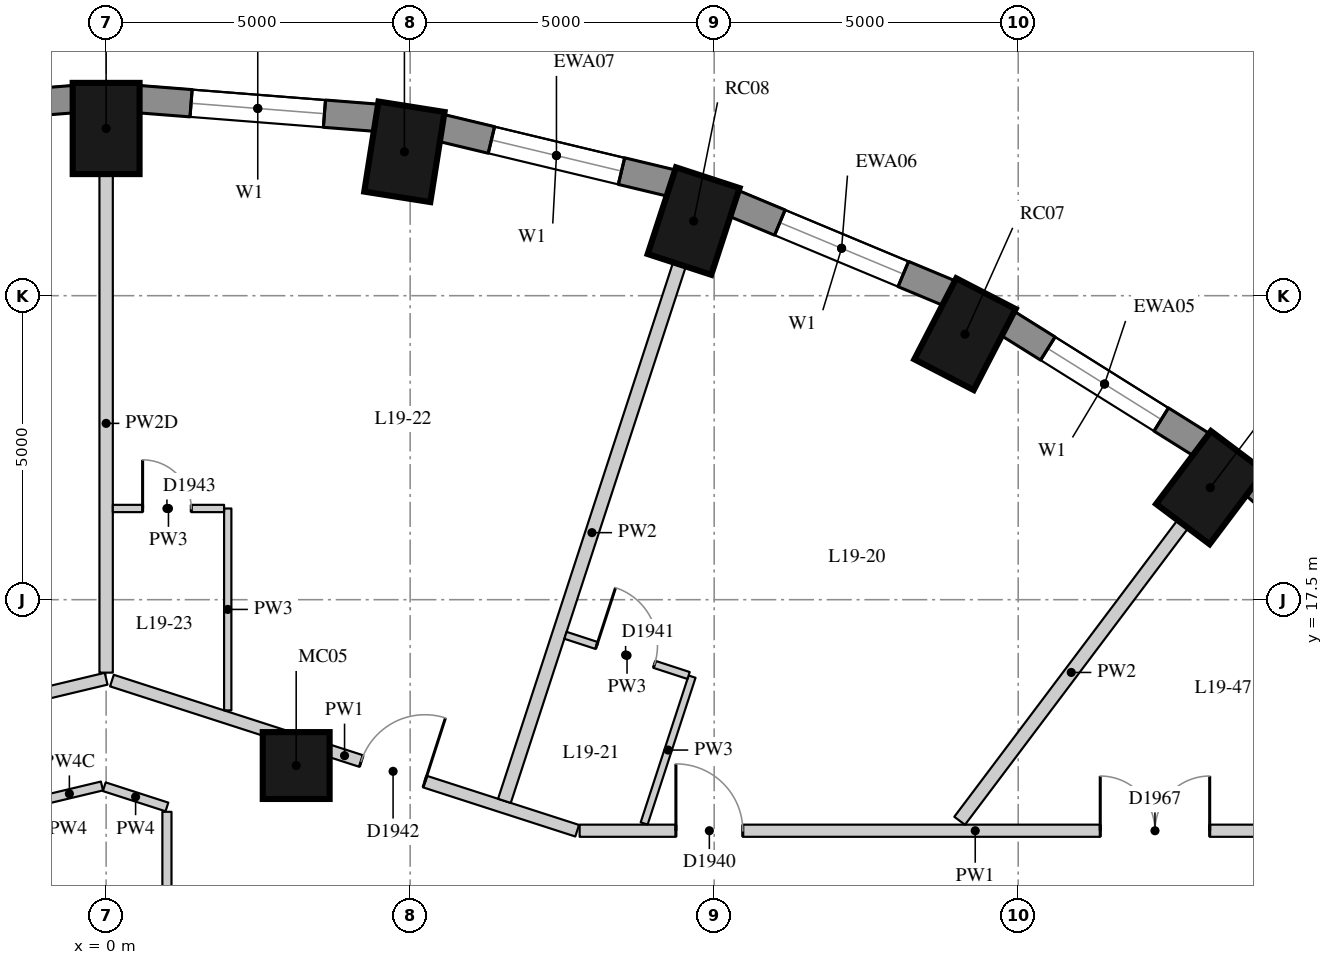
"""IFC4 building model, lengths in metres.
Left out: names, types, materials, properties, quantities, classifications, styles, units other than length and angle.
Written with IfcOpenShell. Run it as: python <this file> out.ifc"""

import sys

from ifc_helpers import new_model, si_unit, direction, frame, frame_2d, origin, origin_2d, place, context, subcontext, project, spatial, rectangle, extrude, element, fill, save


model = new_model("IFC4")
c1 = context("Model", 3, precision=1e-05, world=origin(), true_north=direction((0.0, 1.0)))
c2 = subcontext(c1, "Body", "Model", "MODEL_VIEW")
j1 = project(units=[si_unit("LENGTHUNIT", "METRE"), si_unit("PLANEANGLEUNIT", "RADIAN")], contexts=[c1])
p1 = place(None, origin())
s1 = spatial("IfcSite", under=j1, at=p1, CompositionType="ELEMENT")
p2 = place(p1, origin())
s2 = spatial("IfcBuilding", under=s1, at=p2, CompositionType="ELEMENT")
p3 = place(p2, frame((0.0, 0.0, 71.2)))
s3 = spatial("IfcBuildingStorey", under=s2, at=p3, CompositionType="ELEMENT", Elevation=71.2)
for number, where, z_axis, x_axis in (
    (1, (18.159, 19.343, 0.0), (0.0, 0.0, 1.0), (0.601, 0.799, 0.0)),
    (2, (14.125, 21.867, 0.0), (0.0, 0.0, 1.0), (0.46, 0.888, 0.0)),
    (3, (9.662, 23.727, 0.0), (0.0, 0.0, 1.0), (0.31, 0.951, 0.0)),
    (4, (4.906, 24.866, 0.0), (0.0, 0.0, 1.0), (0.156, 0.988, 0.0)),
    (5, (0.0, 25.25, 0.0), (0.0, 0.0, 1.0), (0.0, 1.0, 0.0)),
):
    element("IfcColumn", number, at=place(p3, frame(where, z_axis=z_axis, x_axis=x_axis)), inside=s3, PredefinedType="COLUMN", context=c2, shape_type="SweptSolid", body=[
        extrude(rectangle(XDim=1.5, YDim=1.1, at=origin_2d()), origin(), (0.0, 0.0, 1.0), 3.3),
    ])
p4 = place(p3, frame((3.126, 14.772, 0.0), z_axis=(0.0, 0.0, 1.0), x_axis=(1.0, 0.0, 0.0)))
e6 = element("IfcColumn", 6, at=p4, inside=s3, PredefinedType="COLUMN", context=c2, shape_type="SweptSolid", body=[
    extrude(rectangle(XDim=1.1, YDim=1.1, at=origin_2d()), origin(), (0.0, 0.0, 1.0), 3.3),
])
p5 = place(p3, frame((21.627, 16.943, 0.0), z_axis=(0.0, 0.0, 1.0), x_axis=(-0.745526233716, 0.66647628228, 0.0)))
e7 = element("IfcWall", 7, at=p5, inside=s3, PredefinedType="SOLIDWALL", context=c2, shape_type="SweptSolid", body=[
    extrude(rectangle(XDim=3.697, YDim=0.45, at=frame_2d((1.848, 0.0))), origin(), (0.0, 0.0, 1.0), 3.02),
])
p6 = place(p3, frame((18.023, 20.044, 0.0), z_axis=(0.0, 0.0, 1.0), x_axis=(-0.847635480093, 0.530579016629, 0.0)))
e8 = element("IfcWall", 8, at=p6, inside=s3, PredefinedType="SOLIDWALL", context=c2, shape_type="SweptSolid", body=[
    extrude(rectangle(XDim=3.782, YDim=0.45, at=frame_2d((1.891, 0.0))), origin(), (0.0, 0.0, 1.0), 3.02),
])
p7 = place(p6, frame((0.791, 0.0, 0.4)))
e9 = element("IfcOpeningElement", 9, at=p7, cuts=e8, PredefinedType="OPENING", context=c2, shape_type="SweptSolid", body=[
    extrude(rectangle(XDim=2.2, YDim=1.75, at=frame_2d((1.1, 0.875))), frame((0.0, 0.235, 0.0), z_axis=(0.0, -1.0, 0.0), x_axis=(1.0, 0.0, 0.0)), (0.0, 0.0, 1.0), 0.47),
])
p8 = place(p3, frame((13.875, 22.537, 0.0), z_axis=(0.0, 0.0, 1.0), x_axis=(-0.923031964282, 0.384723267966, 0.0)))
e10 = element("IfcWall", 10, at=p8, inside=s3, PredefinedType="SOLIDWALL", context=c2, shape_type="SweptSolid", body=[
    extrude(rectangle(XDim=3.856, YDim=0.45, at=frame_2d((1.928, 0.0))), origin(), (0.0, 0.0, 1.0), 3.02),
])
p9 = place(p8, frame((0.828, 0.0, 0.4)))
e11 = element("IfcOpeningElement", 11, at=p9, cuts=e10, PredefinedType="OPENING", context=c2, shape_type="SweptSolid", body=[
    extrude(rectangle(XDim=2.2, YDim=1.75, at=frame_2d((1.1, 0.875))), frame((0.0, 0.235, 0.0), z_axis=(0.0, -1.0, 0.0), x_axis=(1.0, 0.0, 0.0)), (0.0, 0.0, 1.0), 0.47),
])
p10 = place(p3, frame((9.308, 24.35, 0.0), z_axis=(0.0, 0.0, 1.0), x_axis=(-0.972496561493, 0.232917233979, 0.0)))
e12 = element("IfcWall", 12, at=p10, inside=s3, PredefinedType="SOLIDWALL", context=c2, shape_type="SweptSolid", body=[
    extrude(rectangle(XDim=3.911, YDim=0.45, at=frame_2d((1.956, 0.0))), origin(), (0.0, 0.0, 1.0), 3.02),
])
p11 = place(p10, frame((0.855, 0.0, 0.4)))
e13 = element("IfcOpeningElement", 13, at=p11, cuts=e12, PredefinedType="OPENING", context=c2, shape_type="SweptSolid", body=[
    extrude(rectangle(XDim=2.2, YDim=1.75, at=frame_2d((1.1, 0.875))), frame((0.0, 0.235, 0.0), z_axis=(0.0, -1.0, 0.0), x_axis=(1.0, 0.0, 0.0)), (0.0, 0.0, 1.0), 0.47),
])
p12 = place(p3, frame((4.457, 25.426, 0.0), z_axis=(0.0, 0.0, 1.0), x_axis=(-0.996955972145, 0.077966592873, 0.0)))
e14 = element("IfcWall", 14, at=p12, inside=s3, PredefinedType="SOLIDWALL", context=c2, shape_type="SweptSolid", body=[
    extrude(rectangle(XDim=3.939, YDim=0.45, at=frame_2d((1.97, 0.0))), origin(), (0.0, 0.0, 1.0), 3.02),
])
p13 = place(p12, frame((0.87, 0.0, 0.4)))
e15 = element("IfcOpeningElement", 15, at=p13, cuts=e14, PredefinedType="OPENING", context=c2, shape_type="SweptSolid", body=[
    extrude(rectangle(XDim=2.2, YDim=1.75, at=frame_2d((1.1, 0.875))), frame((0.0, 0.235, 0.0), z_axis=(0.0, -1.0, 0.0), x_axis=(1.0, 0.0, 0.0)), (0.0, 0.0, 1.0), 0.47),
])
p14 = place(p3, frame((-0.53, 25.733, 0.0), z_axis=(0.0, 0.0, 1.0), x_axis=(-0.996955972145, -0.077966592873, 0.0)))
e16 = element("IfcWall", 16, at=p14, inside=s3, PredefinedType="SOLIDWALL", context=c2, shape_type="SweptSolid", body=[
    extrude(rectangle(XDim=3.939, YDim=0.45, at=frame_2d((1.97, 0.0))), origin(), (0.0, 0.0, 1.0), 3.02),
])
p15 = place(p14, frame((0.87, 0.0, 0.4)))
e17 = element("IfcOpeningElement", 17, at=p15, cuts=e16, PredefinedType="OPENING", context=c2, shape_type="SweptSolid", body=[
    extrude(rectangle(XDim=2.2, YDim=1.75, at=frame_2d((1.1, 0.875))), frame((0.0, 0.235, 0.0), z_axis=(0.0, -1.0, 0.0), x_axis=(1.0, 0.0, 0.0)), (0.0, 0.0, 1.0), 0.47),
])
p16 = place(p3, frame((-7.683, 14.365, 0.0), z_axis=(0.0, 0.0, 1.0), x_axis=(0.972657109353, 0.23224587752, 0.0)))
e18 = element("IfcWall", 18, at=p16, inside=s3, PredefinedType="PARTITIONING", context=c2, shape_type="SweptSolid", body=[
    extrude(rectangle(XDim=7.899, YDim=0.2, at=frame_2d((3.949, 0.0))), origin(), (0.0, 0.0, 1.0), 2.57),
])
p17 = place(p16, frame((0.22, 0.0, 0.0)))
e19 = element("IfcOpeningElement", 19, at=p17, cuts=e18, PredefinedType="OPENING", context=c2, shape_type="SweptSolid", body=[
    extrude(rectangle(XDim=1.1, YDim=2.1, at=frame_2d((0.55, 1.05))), frame((0.0, 0.11, 0.0), z_axis=(0.0, -1.0, 0.0), x_axis=(1.0, 0.0, 0.0)), (0.0, 0.0, 1.0), 0.22),
])
p18 = place(p3, frame((0.095, 16.169, 0.0), z_axis=(0.0, 0.0, 1.0), x_axis=(0.951667112614, -0.307131416122, 0.0)))
e20 = element("IfcWall", 20, at=p18, inside=s3, PredefinedType="PARTITIONING", context=c2, shape_type="SweptSolid", body=[
    extrude(rectangle(XDim=8.041, YDim=0.2, at=frame_2d((4.02, 0.0))), origin(), (0.0, 0.0, 1.0), 3.02),
])
p19 = place(p18, frame((4.309, 0.0, 0.0)))
e21 = element("IfcOpeningElement", 21, at=p19, cuts=e20, PredefinedType="OPENING", context=c2, shape_type="SweptSolid", body=[
    extrude(rectangle(XDim=1.1, YDim=2.1, at=frame_2d((0.55, 1.05))), frame((0.0, 0.11, 0.0), z_axis=(0.0, -1.0, 0.0), x_axis=(1.0, 0.0, 0.0)), (0.0, 0.0, 1.0), 0.22),
])
p20 = place(p3, frame((7.787, 13.7, 0.0), z_axis=(0.0, 0.0, 1.0), x_axis=(1.0, 0.0, 0.0)))
e22 = element("IfcWall", 22, at=p20, inside=s3, PredefinedType="PARTITIONING", context=c2, shape_type="SweptSolid", body=[
    extrude(rectangle(XDim=13.013, YDim=0.2, at=frame_2d((6.506, 0.0))), origin(), (0.0, 0.0, 1.0), 3.02),
])
p21 = place(p20, frame((1.583, 0.0, 0.0)))
e23 = element("IfcOpeningElement", 23, at=p21, cuts=e22, PredefinedType="OPENING", context=c2, shape_type="SweptSolid", body=[
    extrude(rectangle(XDim=1.1, YDim=2.1, at=frame_2d((0.55, 1.05))), frame((0.0, 0.11, 0.0), z_axis=(0.0, -1.0, 0.0), x_axis=(1.0, 0.0, 0.0)), (0.0, 0.0, 1.0), 0.22),
])
p22 = place(p20, frame((8.562, 0.0, 0.0)))
e24 = element("IfcOpeningElement", 24, at=p22, cuts=e22, PredefinedType="OPENING", context=c2, shape_type="SweptSolid", body=[
    extrude(rectangle(XDim=1.8, YDim=2.1, at=frame_2d((0.9, 1.05))), frame((0.0, 0.11, 0.0), z_axis=(0.0, -1.0, 0.0), x_axis=(1.0, 0.0, 0.0)), (0.0, 0.0, 1.0), 0.22),
])
p23 = place(p3, frame((-1.14, 14.18, 0.0), z_axis=(0.0, 0.0, 1.0), x_axis=(0.972668158826, 0.232199596913, 0.0)))
e25 = element("IfcWall", 25, at=p23, inside=s3, PredefinedType="PARTITIONING", context=c2, shape_type="SweptSolid", body=[
    extrude(rectangle(XDim=1.102, YDim=0.15, at=frame_2d((0.551, 0.0))), origin(), (0.0, 0.0, 1.0), 2.42),
])
p24 = place(p3, frame((-0.031, 14.424, 0.0), z_axis=(0.0, 0.0, 1.0), x_axis=(0.951683114319, -0.307081829354, 0.0)))
e26 = element("IfcWall", 26, at=p24, inside=s3, PredefinedType="PARTITIONING", context=c2, shape_type="SweptSolid", body=[
    extrude(rectangle(XDim=1.083, YDim=0.15, at=frame_2d((0.542, 0.0))), origin(), (0.0, 0.0, 1.0), 3.02),
])
p25 = place(p3, frame((1.0, 14.011, 0.0), z_axis=(0.0, 0.0, 1.0), x_axis=(0.0, -1.0, 0.0)))
e27 = element("IfcWall", 27, at=p25, inside=s3, PredefinedType="PARTITIONING", context=c2, shape_type="SweptSolid", body=[
    extrude(rectangle(XDim=4.861, YDim=0.15, at=frame_2d((2.431, 0.0))), origin(), (0.0, 0.0, 1.0), 3.02),
])
p26 = place(p3, frame((17.708, 18.743, 0.0), z_axis=(0.0, 0.0, 1.0), x_axis=(-0.601170031872, -0.799121137738, 0.0)))
e28 = element("IfcWall", 28, at=p26, inside=s3, PredefinedType="PARTITIONING", context=c2, shape_type="SweptSolid", body=[
    extrude(rectangle(XDim=6.106, YDim=0.22, at=frame_2d((3.053, 0.0))), origin(), (0.0, 0.0, 1.0), 3.02),
])
p27 = place(p3, frame((9.429, 23.014, 0.0), z_axis=(0.0, 0.0, 1.0), x_axis=(-0.310223734739, -0.950663575827, 0.0)))
e29 = element("IfcWall", 29, at=p27, inside=s3, PredefinedType="PARTITIONING", context=c2, shape_type="SweptSolid", body=[
    extrude(rectangle(XDim=9.281, YDim=0.22, at=frame_2d((4.64, 0.0))), origin(), (0.0, 0.0, 1.0), 3.02),
])
p28 = place(p3, frame((0.0, 24.5, 0.0), z_axis=(0.0, 0.0, 1.0), x_axis=(0.0, -1.0, 0.0)))
e30 = element("IfcWall", 30, at=p28, inside=s3, PredefinedType="PARTITIONING", context=c2, shape_type="SweptSolid", body=[
    extrude(rectangle(XDim=8.2, YDim=0.22, at=frame_2d((4.1, 0.0))), origin(), (0.0, 0.0, 1.0), 2.47),
])
p29 = place(p3, frame((8.848, 13.819, 0.0), z_axis=(0.0, 0.0, 1.0), x_axis=(0.310254704997, 0.95065346895, 0.0)))
e31 = element("IfcWall", 31, at=p29, inside=s3, PredefinedType="PARTITIONING", context=c2, shape_type="SweptSolid", body=[
    extrude(rectangle(XDim=2.541, YDim=0.12, at=frame_2d((1.271, 0.0))), origin(), (0.0, 0.0, 1.0), 3.02),
])
p30 = place(p3, frame((2.0, 15.68, 0.0), z_axis=(0.0, 0.0, 1.0), x_axis=(0.0, 1.0, 0.0)))
e32 = element("IfcWall", 32, at=p30, inside=s3, PredefinedType="PARTITIONING", context=c2, shape_type="SweptSolid", body=[
    extrude(rectangle(XDim=3.32, YDim=0.12, at=frame_2d((1.66, 0.0))), origin(), (0.0, 0.0, 1.0), 3.02),
])
p31 = place(p3, frame((9.579, 16.253, 0.0), z_axis=(0.0, 0.0, 1.0), x_axis=(-0.950613738429, 0.310376417129, 0.0)))
e33 = element("IfcWall", 33, at=p31, inside=s3, PredefinedType="PARTITIONING", context=c2, shape_type="SweptSolid", body=[
    extrude(rectangle(XDim=2.13, YDim=0.12, at=frame_2d((1.065, 0.0))), origin(), (0.0, 0.0, 1.0), 3.02),
])
p32 = place(p31, frame((0.59, 0.0, 0.0)))
e34 = element("IfcOpeningElement", 34, at=p32, cuts=e33, PredefinedType="OPENING", context=c2, shape_type="SweptSolid", body=[
    extrude(rectangle(XDim=1.0, YDim=2.1, at=frame_2d((0.5, 1.05))), frame((0.0, 0.07, 0.0), z_axis=(0.0, -1.0, 0.0), x_axis=(1.0, 0.0, 0.0)), (0.0, 0.0, 1.0), 0.14),
])
p33 = place(p3, frame((1.94, 19.0, 0.0), z_axis=(0.0, 0.0, 1.0), x_axis=(-1.0, 0.0, 0.0)))
e35 = element("IfcWall", 35, at=p33, inside=s3, PredefinedType="PARTITIONING", context=c2, shape_type="SweptSolid", body=[
    extrude(rectangle(XDim=1.83, YDim=0.12, at=frame_2d((0.915, 0.0))), origin(), (0.0, 0.0, 1.0), 3.02),
])
p34 = place(p33, frame((0.54, 0.0, 0.0)))
e36 = element("IfcOpeningElement", 36, at=p34, cuts=e35, PredefinedType="OPENING", context=c2, shape_type="SweptSolid", body=[
    extrude(rectangle(XDim=0.8, YDim=2.1, at=frame_2d((0.4, 1.05))), frame((0.0, 0.07, 0.0), z_axis=(0.0, -1.0, 0.0), x_axis=(1.0, 0.0, 0.0)), (0.0, 0.0, 1.0), 0.14),
])
p35 = place(p7, origin())
e37 = element("IfcWindow", 37, at=p35, inside=s3, PartitioningType="SINGLE_PANEL", PredefinedType="WINDOW", context=c2, shape_type="SweptSolid", body=[
    extrude(rectangle(XDim=2.2, YDim=1.75, at=frame_2d((1.1, 0.875))), frame((0.0, 0.035, 0.0), z_axis=(0.0, -1.0, 0.0), x_axis=(1.0, 0.0, 0.0)), (0.0, 0.0, 1.0), 0.06),
])
fill(e9, e37)
p36 = place(p9, origin())
e38 = element("IfcWindow", 38, at=p36, inside=s3, PartitioningType="SINGLE_PANEL", PredefinedType="WINDOW", context=c2, shape_type="SweptSolid", body=[
    extrude(rectangle(XDim=2.2, YDim=1.75, at=frame_2d((1.1, 0.875))), frame((0.0, 0.035, 0.0), z_axis=(0.0, -1.0, 0.0), x_axis=(1.0, 0.0, 0.0)), (0.0, 0.0, 1.0), 0.06),
])
fill(e11, e38)
p37 = place(p11, origin())
e39 = element("IfcWindow", 39, at=p37, inside=s3, PartitioningType="SINGLE_PANEL", PredefinedType="WINDOW", context=c2, shape_type="SweptSolid", body=[
    extrude(rectangle(XDim=2.2, YDim=1.75, at=frame_2d((1.1, 0.875))), frame((0.0, 0.035, 0.0), z_axis=(0.0, -1.0, 0.0), x_axis=(1.0, 0.0, 0.0)), (0.0, 0.0, 1.0), 0.06),
])
fill(e13, e39)
p38 = place(p13, origin())
e40 = element("IfcWindow", 40, at=p38, inside=s3, PartitioningType="SINGLE_PANEL", PredefinedType="WINDOW", context=c2, shape_type="SweptSolid", body=[
    extrude(rectangle(XDim=2.2, YDim=1.75, at=frame_2d((1.1, 0.875))), frame((0.0, 0.035, 0.0), z_axis=(0.0, -1.0, 0.0), x_axis=(1.0, 0.0, 0.0)), (0.0, 0.0, 1.0), 0.06),
])
fill(e15, e40)
p39 = place(p21, origin())
e41 = element("IfcDoor", 41, at=p39, inside=s3, OperationType="SINGLE_SWING_LEFT", PredefinedType="DOOR", context=c2, shape_type="SweptSolid", body=[
    extrude(rectangle(XDim=1.1, YDim=2.1, at=frame_2d((0.55, 1.05))), frame((0.0, 0.025, 0.0), z_axis=(0.0, -1.0, 0.0), x_axis=(1.0, 0.0, 0.0)), (0.0, 0.0, 1.0), 0.05),
])
fill(e23, e41)
p40 = place(p32, origin())
e42 = element("IfcDoor", 42, at=p40, inside=s3, OperationType="SINGLE_SWING_LEFT", PredefinedType="DOOR", context=c2, shape_type="SweptSolid", body=[
    extrude(rectangle(XDim=1.0, YDim=2.1, at=frame_2d((0.5, 1.05))), frame((0.0, 0.025, 0.0), z_axis=(0.0, -1.0, 0.0), x_axis=(1.0, 0.0, 0.0)), (0.0, 0.0, 1.0), 0.05),
])
fill(e34, e42)
p41 = place(p19, origin())
e43 = element("IfcDoor", 43, at=p41, inside=s3, OperationType="SINGLE_SWING_RIGHT", PredefinedType="DOOR", context=c2, shape_type="SweptSolid", body=[
    extrude(rectangle(XDim=1.1, YDim=2.1, at=frame_2d((0.55, 1.05))), frame((0.0, 0.025, 0.0), z_axis=(0.0, -1.0, 0.0), x_axis=(1.0, 0.0, 0.0)), (0.0, 0.0, 1.0), 0.05),
])
fill(e21, e43)
p42 = place(p34, origin())
e44 = element("IfcDoor", 44, at=p42, inside=s3, OperationType="SINGLE_SWING_LEFT", PredefinedType="DOOR", context=c2, shape_type="SweptSolid", body=[
    extrude(rectangle(XDim=0.8, YDim=2.1, at=frame_2d((0.4, 1.05))), frame((0.0, 0.025, 0.0), z_axis=(0.0, -1.0, 0.0), x_axis=(1.0, 0.0, 0.0)), (0.0, 0.0, 1.0), 0.05),
])
fill(e36, e44)
p43 = place(p22, origin())
e45 = element("IfcDoor", 45, at=p43, inside=s3, OperationType="DOUBLE_DOOR_SINGLE_SWING", PredefinedType="DOOR", context=c2, shape_type="SweptSolid", body=[
    extrude(rectangle(XDim=1.8, YDim=2.1, at=frame_2d((0.9, 1.05))), frame((0.0, 0.025, 0.0), z_axis=(0.0, -1.0, 0.0), x_axis=(1.0, 0.0, 0.0)), (0.0, 0.0, 1.0), 0.05),
])
fill(e24, e45)
save(model, sys.argv[1])
